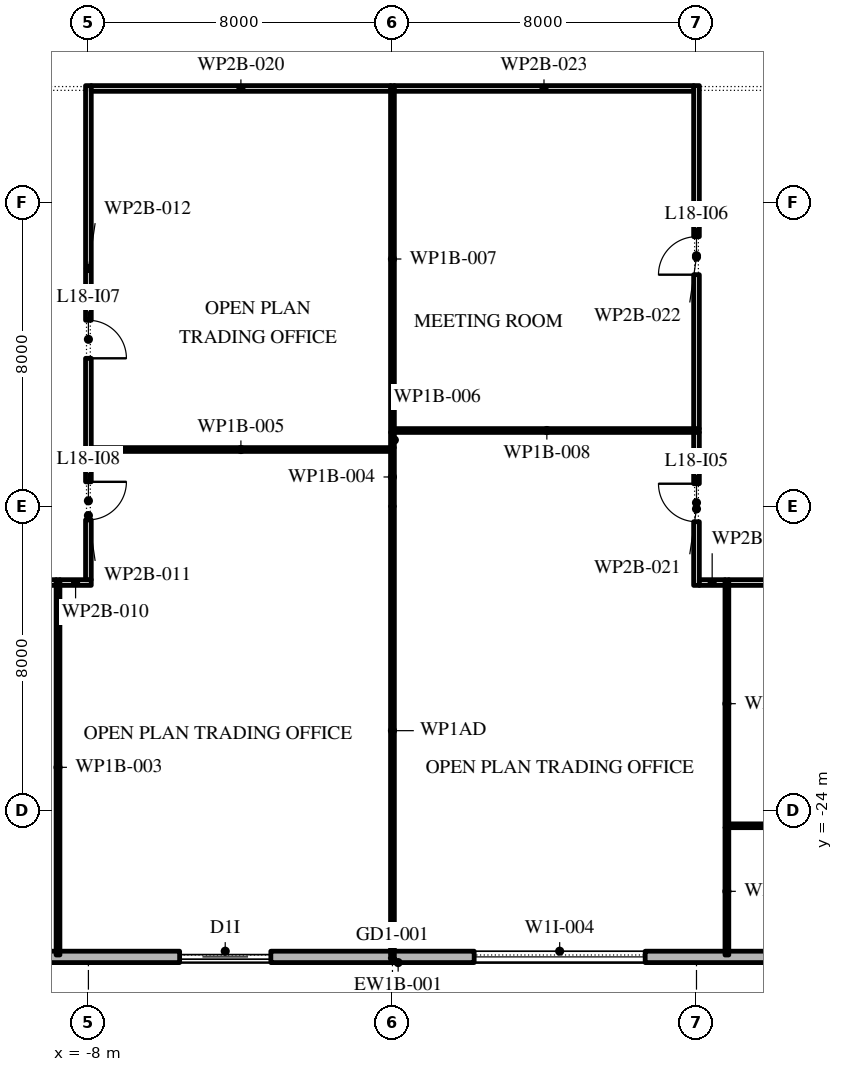
"""IFC4 building model, lengths in metres.
Left out: names, types, materials, properties, quantities, classifications, styles, units other than length and angle.
Written with IfcOpenShell. Run it as: python <this file> out.ifc"""

import sys

from ifc_helpers import new_model, si_unit, direction, frame, frame_2d, origin, place, context, subcontext, project, spatial, rectangle, extrude, element, fill, save


model = new_model("IFC4")
c1 = context("Model", 3, precision=1e-05, world=origin(), true_north=direction((0.0, 1.0)))
c2 = subcontext(c1, "Body", "Model", "MODEL_VIEW")
j1 = project(units=[si_unit("LENGTHUNIT", "METRE"), si_unit("PLANEANGLEUNIT", "RADIAN")], contexts=[c1])
p1 = place(None, origin())
s1 = spatial("IfcSite", under=j1, at=p1, CompositionType="ELEMENT")
p2 = place(p1, origin())
s2 = spatial("IfcBuilding", under=s1, at=p2, CompositionType="ELEMENT")
p3 = place(p2, frame((0.0, 0.0, 85.8)))
s3 = spatial("IfcBuildingStorey", under=s2, at=p3, CompositionType="ELEMENT", Elevation=85.8)
p4 = place(p3, frame((-26.1, -27.85, 0.0), z_axis=(0.0, 0.0, 1.0), x_axis=(1.0, 0.0, 0.0)))
e1 = element("IfcWall", 1, at=p4, inside=s3, PredefinedType="STANDARD", context=c2, shape_type="SweptSolid", body=[
    extrude(rectangle(XDim=52.5, YDim=0.3, at=frame_2d((26.25, 0.0))), origin(), (0.0, 0.0, 1.0), 3.95),
])
p5 = place(p4, frame((2.0, 0.0, 0.45)))
e2 = element("IfcOpeningElement", 2, at=p5, cuts=e1, PredefinedType="OPENING", context=c2, shape_type="SweptSolid", body=[
    extrude(rectangle(XDim=4.5, YDim=2.7, at=frame_2d((2.25, 1.35))), frame((0.0, 0.16, 0.0), z_axis=(0.0, -1.0, 0.0), x_axis=(1.0, 0.0, 0.0)), (0.0, 0.0, 1.0), 0.32),
])
p6 = place(p4, frame((10.65, 0.0, 0.45)))
e3 = element("IfcOpeningElement", 3, at=p6, cuts=e1, PredefinedType="OPENING", context=c2, shape_type="SweptSolid", body=[
    extrude(rectangle(XDim=4.5, YDim=3.05, at=frame_2d((2.25, 1.525))), frame((0.0, 0.16, 0.0), z_axis=(0.0, -1.0, 0.0), x_axis=(1.0, 0.0, 0.0)), (0.0, 0.0, 1.0), 0.32),
])
p7 = place(p4, frame((20.5, 0.0, 0.0)))
e4 = element("IfcOpeningElement", 4, at=p7, cuts=e1, PredefinedType="OPENING", context=c2, shape_type="SweptSolid", body=[
    extrude(rectangle(XDim=2.4, YDim=3.15, at=frame_2d((1.2, 1.575))), frame((0.0, 0.16, 0.0), z_axis=(0.0, -1.0, 0.0), x_axis=(1.0, 0.0, 0.0)), (0.0, 0.0, 1.0), 0.32),
])
p8 = place(p4, frame((28.25, 0.0, 0.45)))
e5 = element("IfcOpeningElement", 5, at=p8, cuts=e1, PredefinedType="OPENING", context=c2, shape_type="SweptSolid", body=[
    extrude(rectangle(XDim=4.5, YDim=2.7, at=frame_2d((2.25, 1.35))), frame((0.0, 0.16, 0.0), z_axis=(0.0, -1.0, 0.0), x_axis=(1.0, 0.0, 0.0)), (0.0, 0.0, 1.0), 0.32),
])
p9 = place(p4, frame((37.05, 0.0, 0.45)))
e6 = element("IfcOpeningElement", 6, at=p9, cuts=e1, PredefinedType="OPENING", context=c2, shape_type="SweptSolid", body=[
    extrude(rectangle(XDim=4.5, YDim=3.05, at=frame_2d((2.25, 1.525))), frame((0.0, 0.16, 0.0), z_axis=(0.0, -1.0, 0.0), x_axis=(1.0, 0.0, 0.0)), (0.0, 0.0, 1.0), 0.32),
])
p10 = place(p4, frame((45.85, 0.0, 0.45)))
e7 = element("IfcOpeningElement", 7, at=p10, cuts=e1, PredefinedType="OPENING", context=c2, shape_type="SweptSolid", body=[
    extrude(rectangle(XDim=4.5, YDim=2.7, at=frame_2d((2.25, 1.35))), frame((0.0, 0.16, 0.0), z_axis=(0.0, -1.0, 0.0), x_axis=(1.0, 0.0, 0.0)), (0.0, 0.0, 1.0), 0.32),
])
p11 = place(p3, frame((-8.8, -27.8, 0.0), z_axis=(0.0, 0.0, 1.0), x_axis=(0.0, 1.0, 0.0)))
e8 = element("IfcWall", 8, at=p11, inside=s3, PredefinedType="PARTITIONING", context=c2, shape_type="SweptSolid", body=[
    extrude(rectangle(XDim=9.875, YDim=0.1, at=frame_2d((4.938, 0.0))), origin(), (0.0, 0.0, 1.0), 3.95),
])
p12 = place(p3, frame((-8.85, -18.0, 0.0), z_axis=(0.0, 0.0, 1.0), x_axis=(-1.0, 0.0, 0.0)))
e9 = element("IfcWall", 9, at=p12, inside=s3, PredefinedType="PARTITIONING", context=c2, shape_type="SweptSolid", body=[
    extrude(rectangle(XDim=15.075, YDim=0.15, at=frame_2d((7.538, 0.0))), origin(), (0.0, 0.0, 1.0), 3.95),
])
p13 = place(p12, frame((6.7, 0.0, 0.0)))
e10 = element("IfcOpeningElement", 10, at=p13, cuts=e9, PredefinedType="OPENING", context=c2, shape_type="SweptSolid", body=[
    extrude(rectangle(XDim=1.8, YDim=2.1, at=frame_2d((0.9, 1.05))), frame((0.0, 0.085, 0.0), z_axis=(0.0, -1.0, 0.0), x_axis=(1.0, 0.0, 0.0)), (0.0, 0.0, 1.0), 0.17),
])
p14 = place(p3, frame((-7.925, -18.0, 0.0), z_axis=(0.0, 0.0, 1.0), x_axis=(-1.0, 0.0, 0.0)))
e11 = element("IfcWall", 11, at=p14, inside=s3, PredefinedType="PARTITIONING", context=c2, shape_type="SweptSolid", body=[
    extrude(rectangle(XDim=0.825, YDim=0.15, at=frame_2d((0.413, 0.0))), origin(), (0.0, 0.0, 1.0), 3.95),
])
p15 = place(p3, frame((-8.0, -14.55, 0.0), z_axis=(0.0, 0.0, 1.0), x_axis=(0.0, -1.0, 0.0)))
e12 = element("IfcWall", 12, at=p15, inside=s3, PredefinedType="PARTITIONING", context=c2, shape_type="SweptSolid", body=[
    extrude(rectangle(XDim=3.375, YDim=0.15, at=frame_2d((1.688, 0.0))), origin(), (0.0, 0.0, 1.0), 3.95),
])
p16 = place(p15, frame((0.8, 0.0, 0.0)))
e13 = element("IfcOpeningElement", 13, at=p16, cuts=e12, PredefinedType="OPENING", context=c2, shape_type="SweptSolid", body=[
    extrude(rectangle(XDim=1.0, YDim=2.1, at=frame_2d((0.5, 1.05))), frame((0.0, 0.085, 0.0), z_axis=(0.0, -1.0, 0.0), x_axis=(1.0, 0.0, 0.0)), (0.0, 0.0, 1.0), 0.17),
])
p17 = place(p3, frame((-8.0, -4.925, 0.0), z_axis=(0.0, 0.0, 1.0), x_axis=(0.0, -1.0, 0.0)))
e14 = element("IfcWall", 14, at=p17, inside=s3, PredefinedType="PARTITIONING", context=c2, shape_type="SweptSolid", body=[
    extrude(rectangle(XDim=9.625, YDim=0.15, at=frame_2d((4.812, 0.0))), origin(), (0.0, 0.0, 1.0), 3.95),
])
p18 = place(p17, frame((6.175, 0.0, 0.0)))
e15 = element("IfcOpeningElement", 15, at=p18, cuts=e14, PredefinedType="OPENING", context=c2, shape_type="SweptSolid", body=[
    extrude(rectangle(XDim=1.0, YDim=2.1, at=frame_2d((0.5, 1.05))), frame((0.0, 0.085, 0.0), z_axis=(0.0, -1.0, 0.0), x_axis=(1.0, 0.0, 0.0)), (0.0, 0.0, 1.0), 0.17),
])
p19 = place(p3, frame((0.0, -27.8, 0.0), z_axis=(0.0, 0.0, 1.0), x_axis=(0.0, 1.0, 0.0)))
e16 = element("IfcWall", 16, at=p19, inside=s3, PredefinedType="PARTITIONING", context=c2, shape_type="SweptSolid", body=[
    extrude(rectangle(XDim=11.805, YDim=0.1, at=frame_2d((5.902, 0.0))), origin(), (0.0, 0.0, 1.0), 3.272),
])
p20 = place(p3, frame((-0.05, -14.5, 0.0), z_axis=(0.0, 0.0, 1.0), x_axis=(-1.0, 0.0, 0.0)))
e17 = element("IfcWall", 17, at=p20, inside=s3, PredefinedType="PARTITIONING", context=c2, shape_type="SweptSolid", body=[
    extrude(rectangle(XDim=7.875, YDim=0.1, at=frame_2d((3.938, 0.0))), origin(), (0.0, 0.0, 1.0), 3.95),
])
p21 = place(p3, frame((0.0, -14.45, 0.0), z_axis=(0.0, 0.0, 1.0), x_axis=(0.0, 1.0, 0.0)))
e18 = element("IfcWall", 18, at=p21, inside=s3, PredefinedType="PARTITIONING", context=c2, shape_type="SweptSolid", body=[
    extrude(rectangle(XDim=0.4, YDim=0.1, at=frame_2d((0.2, 0.0))), origin(), (0.0, 0.0, 1.0), 3.95),
])
p22 = place(p3, frame((0.0, -14.05, 0.0), z_axis=(0.0, 0.0, 1.0), x_axis=(0.0, 1.0, 0.0)))
e19 = element("IfcWall", 19, at=p22, inside=s3, PredefinedType="PARTITIONING", context=c2, shape_type="SweptSolid", body=[
    extrude(rectangle(XDim=9.125, YDim=0.1, at=frame_2d((4.562, 0.0))), origin(), (0.0, 0.0, 1.0), 3.95),
])
p23 = place(p3, frame((0.05, -14.0, 0.0), z_axis=(0.0, 0.0, 1.0), x_axis=(1.0, 0.0, 0.0)))
e20 = element("IfcWall", 20, at=p23, inside=s3, PredefinedType="PARTITIONING", context=c2, shape_type="SweptSolid", body=[
    extrude(rectangle(XDim=8.025, YDim=0.1, at=frame_2d((4.012, 0.0))), origin(), (0.0, 0.0, 1.0), 3.95),
])
p24 = place(p3, frame((-0.05, -5.0, 0.0), z_axis=(0.0, 0.0, 1.0), x_axis=(-1.0, 0.0, 0.0)))
e21 = element("IfcWall", 21, at=p24, inside=s3, PredefinedType="PARTITIONING", context=c2, shape_type="SweptSolid", body=[
    extrude(rectangle(XDim=7.875, YDim=0.15, at=frame_2d((3.938, 0.0))), origin(), (0.0, 0.0, 1.0), 3.95),
])
p25 = place(p3, frame((8.0, -18.075, 0.0), z_axis=(0.0, 0.0, 1.0), x_axis=(0.0, 1.0, 0.0)))
e22 = element("IfcWall", 22, at=p25, inside=s3, PredefinedType="PARTITIONING", context=c2, shape_type="SweptSolid", body=[
    extrude(rectangle(XDim=4.025, YDim=0.15, at=frame_2d((2.012, 0.0))), origin(), (0.0, 0.0, 1.0), 3.95),
])
p26 = place(p25, frame((1.675, 0.0, 0.0)))
e23 = element("IfcOpeningElement", 23, at=p26, cuts=e22, PredefinedType="OPENING", context=c2, shape_type="SweptSolid", body=[
    extrude(rectangle(XDim=1.0, YDim=2.1, at=frame_2d((0.5, 1.05))), frame((0.0, 0.085, 0.0), z_axis=(0.0, -1.0, 0.0), x_axis=(1.0, 0.0, 0.0)), (0.0, 0.0, 1.0), 0.17),
])
p27 = place(p3, frame((8.0, -13.95, 0.0), z_axis=(0.0, 0.0, 1.0), x_axis=(0.0, 1.0, 0.0)))
e24 = element("IfcWall", 24, at=p27, inside=s3, PredefinedType="PARTITIONING", context=c2, shape_type="SweptSolid", body=[
    extrude(rectangle(XDim=9.025, YDim=0.15, at=frame_2d((4.512, 0.0))), origin(), (0.0, 0.0, 1.0), 3.95),
])
p28 = place(p27, frame((4.05, 0.0, 0.0)))
e25 = element("IfcOpeningElement", 25, at=p28, cuts=e24, PredefinedType="OPENING", context=c2, shape_type="SweptSolid", body=[
    extrude(rectangle(XDim=1.0, YDim=2.1, at=frame_2d((0.5, 1.05))), frame((0.0, 0.085, 0.0), z_axis=(0.0, -1.0, 0.0), x_axis=(1.0, 0.0, 0.0)), (0.0, 0.0, 1.0), 0.17),
])
p29 = place(p3, frame((7.925, -5.0, 0.0), z_axis=(0.0, 0.0, 1.0), x_axis=(-1.0, 0.0, 0.0)))
e26 = element("IfcWall", 26, at=p29, inside=s3, PredefinedType="PARTITIONING", context=c2, shape_type="SweptSolid", body=[
    extrude(rectangle(XDim=7.875, YDim=0.15, at=frame_2d((3.938, 0.0))), origin(), (0.0, 0.0, 1.0), 3.95),
])
p30 = place(p3, frame((8.8, -27.8, 0.0), z_axis=(0.0, 0.0, 1.0), x_axis=(0.0, 1.0, 0.0)))
e27 = element("IfcWall", 27, at=p30, inside=s3, PredefinedType="PARTITIONING", context=c2, shape_type="SweptSolid", body=[
    extrude(rectangle(XDim=3.35, YDim=0.1, at=frame_2d((1.675, 0.0))), origin(), (0.0, 0.0, 1.0), 3.95),
])
p31 = place(p3, frame((8.8, -24.45, 0.0), z_axis=(0.0, 0.0, 1.0), x_axis=(0.0, 1.0, 0.0)))
e28 = element("IfcWall", 28, at=p31, inside=s3, PredefinedType="PARTITIONING", context=c2, shape_type="SweptSolid", body=[
    extrude(rectangle(XDim=6.525, YDim=0.1, at=frame_2d((3.262, 0.0))), origin(), (0.0, 0.0, 1.0), 3.95),
])
p32 = place(p3, frame((8.85, -24.4, 0.0), z_axis=(0.0, 0.0, 1.0), x_axis=(1.0, 0.0, 0.0)))
e29 = element("IfcWall", 29, at=p32, inside=s3, PredefinedType="PARTITIONING", context=c2, shape_type="SweptSolid", body=[
    extrude(rectangle(XDim=17.56, YDim=0.1, at=frame_2d((8.78, 0.0))), origin(), (0.0, 0.0, 1.0), 3.95),
])
p33 = place(p32, frame((6.65, 0.0, 0.0)))
e30 = element("IfcOpeningElement", 30, at=p33, cuts=e29, PredefinedType="OPENING", context=c2, shape_type="SweptSolid", body=[
    extrude(rectangle(XDim=0.9, YDim=2.1, at=frame_2d((0.45, 1.05))), frame((0.0, 0.06, 0.0), z_axis=(0.0, -1.0, 0.0), x_axis=(1.0, 0.0, 0.0)), (0.0, 0.0, 1.0), 0.12),
])
p34 = place(p3, frame((8.75, -18.0, 0.0), z_axis=(0.0, 0.0, 1.0), x_axis=(-1.0, 0.0, 0.0)))
e31 = element("IfcWall", 31, at=p34, inside=s3, PredefinedType="PARTITIONING", context=c2, shape_type="SweptSolid", body=[
    extrude(rectangle(XDim=0.675, YDim=0.15, at=frame_2d((0.337, 0.0))), origin(), (0.0, 0.0, 1.0), 3.95),
])
p35 = place(p3, frame((24.075, -18.0, 0.0), z_axis=(0.0, 0.0, 1.0), x_axis=(-1.0, 0.0, 0.0)))
e32 = element("IfcWall", 32, at=p35, inside=s3, PredefinedType="PARTITIONING", context=c2, shape_type="SweptSolid", body=[
    extrude(rectangle(XDim=15.225, YDim=0.15, at=frame_2d((7.612, 0.0))), origin(), (0.0, 0.0, 1.0), 3.95),
])
p36 = place(p35, frame((10.125, 0.0, 0.0)))
e33 = element("IfcOpeningElement", 33, at=p36, cuts=e32, PredefinedType="OPENING", context=c2, shape_type="SweptSolid", body=[
    extrude(rectangle(XDim=1.0, YDim=2.1, at=frame_2d((0.5, 1.05))), frame((0.0, 0.085, 0.0), z_axis=(0.0, -1.0, 0.0), x_axis=(1.0, 0.0, 0.0)), (0.0, 0.0, 1.0), 0.17),
])
p37 = place(p3, frame((0.0, -15.995, 0.0), z_axis=(0.0, 0.0, 1.0), x_axis=(0.0, 1.0, 0.0)))
e34 = element("IfcWall", 34, at=p37, inside=s3, PredefinedType="PARTITIONING", context=c2, shape_type="SweptSolid", body=[
    extrude(rectangle(XDim=1.545, YDim=0.1, at=frame_2d((0.772, 0.0))), origin(), (0.0, 0.0, 1.0), 3.95),
])
p38 = place(p7, origin())
e35 = element("IfcDoor", 35, at=p38, inside=s3, OperationType="DOUBLE_DOOR_SLIDING", PredefinedType="DOOR", context=c2, shape_type="SweptSolid", body=[
    extrude(rectangle(XDim=2.4, YDim=3.15, at=frame_2d((1.2, 1.575))), frame((0.0, 0.025, 0.0), z_axis=(0.0, -1.0, 0.0), x_axis=(1.0, 0.0, 0.0)), (0.0, 0.0, 1.0), 0.05),
])
fill(e4, e35)
p39 = place(p8, origin())
e36 = element("IfcWindow", 36, at=p39, inside=s3, PartitioningType="DOUBLE_PANEL_VERTICAL", PredefinedType="WINDOW", context=c2, shape_type="SweptSolid", body=[
    extrude(rectangle(XDim=4.5, YDim=2.7, at=frame_2d((2.25, 1.35))), frame((0.0, 0.03, 0.0), z_axis=(0.0, -1.0, 0.0), x_axis=(1.0, 0.0, 0.0)), (0.0, 0.0, 1.0), 0.06),
])
fill(e5, e36)
p40 = place(p26, origin())
e37 = element("IfcDoor", 37, at=p40, inside=s3, OperationType="SINGLE_SWING_LEFT", PredefinedType="DOOR", context=c2, shape_type="SweptSolid", body=[
    extrude(rectangle(XDim=1.0, YDim=2.1, at=frame_2d((0.5, 1.05))), frame((0.0, 0.025, 0.0), z_axis=(0.0, -1.0, 0.0), x_axis=(1.0, 0.0, 0.0)), (0.0, 0.0, 1.0), 0.05),
])
fill(e23, e37)
p41 = place(p28, origin())
e38 = element("IfcDoor", 38, at=p41, inside=s3, OperationType="SINGLE_SWING_RIGHT", PredefinedType="DOOR", context=c2, shape_type="SweptSolid", body=[
    extrude(rectangle(XDim=1.0, YDim=2.1, at=frame_2d((0.5, 1.05))), frame((0.0, 0.025, 0.0), z_axis=(0.0, -1.0, 0.0), x_axis=(1.0, 0.0, 0.0)), (0.0, 0.0, 1.0), 0.05),
])
fill(e25, e38)
p42 = place(p18, origin())
e39 = element("IfcDoor", 39, at=p42, inside=s3, OperationType="SINGLE_SWING_LEFT", PredefinedType="DOOR", context=c2, shape_type="SweptSolid", body=[
    extrude(rectangle(XDim=1.0, YDim=2.1, at=frame_2d((0.5, 1.05))), frame((0.0, 0.025, 0.0), z_axis=(0.0, -1.0, 0.0), x_axis=(1.0, 0.0, 0.0)), (0.0, 0.0, 1.0), 0.05),
])
fill(e15, e39)
p43 = place(p16, origin())
e40 = element("IfcDoor", 40, at=p43, inside=s3, OperationType="SINGLE_SWING_RIGHT", PredefinedType="DOOR", context=c2, shape_type="SweptSolid", body=[
    extrude(rectangle(XDim=1.0, YDim=2.1, at=frame_2d((0.5, 1.05))), frame((0.0, 0.025, 0.0), z_axis=(0.0, -1.0, 0.0), x_axis=(1.0, 0.0, 0.0)), (0.0, 0.0, 1.0), 0.05),
])
fill(e13, e40)
save(model, sys.argv[1])
